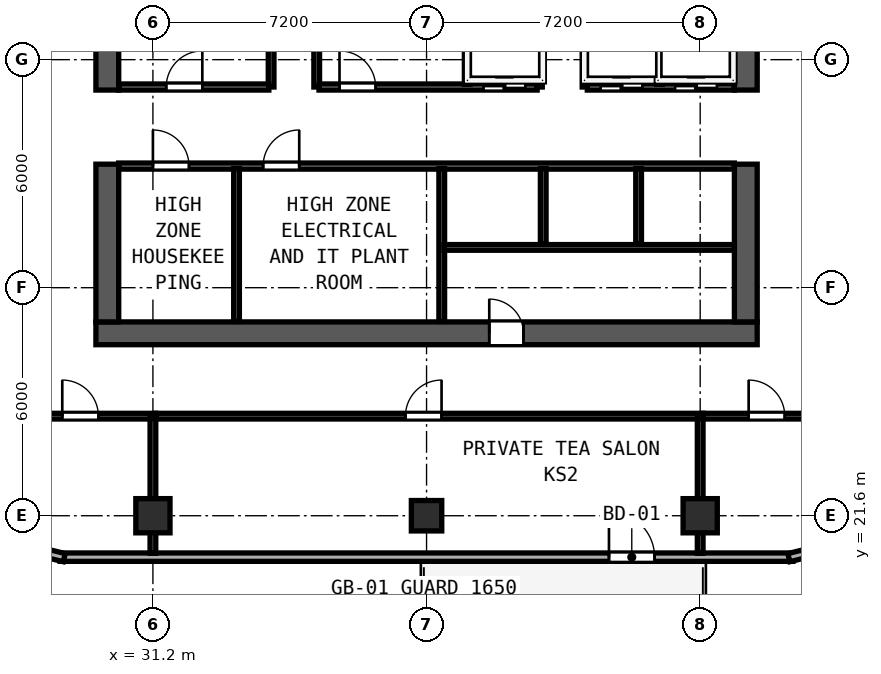
"""IFC4 building model, lengths in metres.
Left out: names, types, materials, properties, quantities, classifications, styles, units other than length and angle.
Written with IfcOpenShell. Run it as: python <this file> out.ifc"""

import sys

from ifc_helpers import new_model, si_unit, direction, frame, frame_2d, origin, origin_2d, place, context, subcontext, project, spatial, rectangle, hollow_rectangle, extrude, element, fill, save


model = new_model("IFC4")
c1 = context("Model", 3, precision=1e-05, world=origin(), true_north=direction((0.0, 1.0)))
c2 = subcontext(c1, "Body", "Model", "MODEL_VIEW")
j1 = project(units=[si_unit("LENGTHUNIT", "METRE"), si_unit("PLANEANGLEUNIT", "RADIAN")], contexts=[c1])
p1 = place(None, origin())
s1 = spatial("IfcSite", under=j1, at=p1, CompositionType="ELEMENT")
p2 = place(p1, origin())
s2 = spatial("IfcBuilding", under=s1, at=p2, CompositionType="ELEMENT")
p3 = place(p2, frame((0.0, 0.0, 176.6)))
s3 = spatial("IfcBuildingStorey", under=s2, at=p3, CompositionType="ELEMENT", Elevation=176.6)
p4 = place(p3, frame((29.7, 26.4, 0.0), z_axis=(0.0, 0.0, 1.0), x_axis=(1.0, 0.0, 0.0)))
e1 = element("IfcWall", 1, at=p4, inside=s3, PredefinedType="SHEAR", context=c2, shape_type="SweptSolid", body=[
    extrude(rectangle(XDim=17.4, YDim=0.6, at=frame_2d((8.7, 0.0))), origin(), (0.0, 0.0, 1.0), 3.62),
])
p5 = place(p4, frame((11.25, 0.0, 0.0), z_axis=(0.0, 0.0, 1.0), x_axis=(-1.0, 0.0, 0.0)))
e2 = element("IfcOpeningElement", 2, at=p5, cuts=e1, PredefinedType="OPENING", context=c2, shape_type="SweptSolid", body=[
    extrude(rectangle(XDim=0.9, YDim=2.1, at=frame_2d((0.45, 1.05))), frame((0.0, 0.31, 0.0), z_axis=(0.0, -1.0, 0.0), x_axis=(1.0, 0.0, 0.0)), (0.0, 0.0, 1.0), 0.62),
])
p6 = place(p3, frame((30.0, 26.7, 0.0), z_axis=(0.0, 0.0, 1.0), x_axis=(0.0, 1.0, 0.0)))
e3 = element("IfcWall", 3, at=p6, inside=s3, PredefinedType="SHEAR", context=c2, shape_type="SweptSolid", body=[
    extrude(rectangle(XDim=4.15, YDim=0.6, at=frame_2d((2.075, 0.0))), origin(), (0.0, 0.0, 1.0), 3.62),
])
p7 = place(p3, frame((30.0, 32.8, 0.0), z_axis=(0.0, 0.0, 1.0), x_axis=(0.0, 1.0, 0.0)))
e4 = element("IfcWall", 4, at=p7, inside=s3, PredefinedType="SHEAR", context=c2, shape_type="SweptSolid", body=[
    extrude(rectangle(XDim=10.1, YDim=0.6, at=frame_2d((5.05, 0.0))), origin(), (0.0, 0.0, 1.0), 3.62),
])
p8 = place(p3, frame((46.8, 26.7, 0.0), z_axis=(0.0, 0.0, 1.0), x_axis=(0.0, 1.0, 0.0)))
e5 = element("IfcWall", 5, at=p8, inside=s3, PredefinedType="SHEAR", context=c2, shape_type="SweptSolid", body=[
    extrude(rectangle(XDim=4.15, YDim=0.6, at=frame_2d((2.075, 0.0))), origin(), (0.0, 0.0, 1.0), 3.62),
])
p9 = place(p3, frame((46.8, 32.8, 0.0), z_axis=(0.0, 0.0, 1.0), x_axis=(0.0, 1.0, 0.0)))
e6 = element("IfcWall", 6, at=p9, inside=s3, PredefinedType="SHEAR", context=c2, shape_type="SweptSolid", body=[
    extrude(rectangle(XDim=10.1, YDim=0.6, at=frame_2d((5.05, 0.0))), origin(), (0.0, 0.0, 1.0), 3.62),
])
for number, where, z_axis, x_axis in (
    (7, (31.2, 21.6, 0.0), (0.0, 0.0, 1.0), (1.0, 0.0, 0.0)),
    (8, (45.6, 21.6, 0.0), (0.0, 0.0, 1.0), (1.0, 0.0, 0.0)),
):
    element("IfcColumn", number, at=place(p3, frame(where, z_axis=z_axis, x_axis=x_axis)), inside=s3, PredefinedType="COLUMN", context=c2, shape_type="SweptSolid", body=[
        extrude(hollow_rectangle(XDim=0.9, YDim=0.9, WallThickness=0.034, at=origin_2d()), origin(), (0.0, 0.0, 1.0), 3.8),
    ])
p10 = place(p3, frame((38.4, 21.6, 0.0), z_axis=(0.0, 0.0, 1.0), x_axis=(1.0, 0.0, 0.0)))
e9 = element("IfcColumn", 9, at=p10, inside=s3, PredefinedType="COLUMN", context=c2, shape_type="SweptSolid", body=[
    extrude(hollow_rectangle(XDim=0.8, YDim=0.8, WallThickness=0.03, at=origin_2d()), origin(), (0.0, 0.0, 1.0), 3.8),
])
p11 = place(p3, frame((28.759, 20.51, 0.0), z_axis=(0.0, 0.0, 1.0), x_axis=(1.0, 0.0, 0.0)))
e10 = element("IfcWall", 10, at=p11, inside=s3, PredefinedType="SOLIDWALL", context=c2, shape_type="SweptSolid", body=[
    extrude(rectangle(XDim=19.283, YDim=0.22, at=frame_2d((9.642, 0.0))), origin(), (0.0, 0.0, 1.0), 3.62),
])
p12 = place(p11, frame((15.641, 0.0, 0.0), z_axis=(0.0, 0.0, 1.0), x_axis=(-1.0, 0.0, 0.0)))
e11 = element("IfcOpeningElement", 11, at=p12, cuts=e10, PredefinedType="OPENING", context=c2, shape_type="SweptSolid", body=[
    extrude(rectangle(XDim=1.2, YDim=2.15, at=frame_2d((0.6, 1.075))), frame((0.0, 0.12, 0.0), z_axis=(0.0, -1.0, 0.0), x_axis=(1.0, 0.0, 0.0)), (0.0, 0.0, 1.0), 0.24),
])
p13 = place(p3, frame((47.933, 20.497, 0.0), z_axis=(0.0, 0.0, 1.0), x_axis=(0.970142500145, 0.242535625036, 0.0)))
e12 = element("IfcWall", 12, at=p13, inside=s3, PredefinedType="SOLIDWALL", context=c2, shape_type="SweptSolid", body=[
    extrude(rectangle(XDim=4.561, YDim=0.22, at=frame_2d((2.281, 0.0))), origin(), (0.0, 0.0, 1.0), 3.215),
])
p14 = place(p13, frame((0.7, 0.0, 0.85)))
e13 = element("IfcOpeningElement", 13, at=p14, cuts=e12, PredefinedType="OPENING", context=c2, shape_type="SweptSolid", body=[
    extrude(rectangle(XDim=1.1, YDim=1.75, at=frame_2d((0.55, 0.875))), frame((0.0, 0.12, 0.0), z_axis=(0.0, -1.0, 0.0), x_axis=(1.0, 0.0, 0.0)), (0.0, 0.0, 1.0), 0.24),
])
p15 = place(p3, frame((24.442, 21.603, 0.0), z_axis=(0.0, 0.0, 1.0), x_axis=(0.970145648609, -0.242523030833, 0.0)))
e14 = element("IfcWall", 14, at=p15, inside=s3, PredefinedType="SOLIDWALL", context=c2, shape_type="SweptSolid", body=[
    extrude(rectangle(XDim=4.561, YDim=0.22, at=frame_2d((2.281, 0.0))), origin(), (0.0, 0.0, 1.0), 3.215),
])
p16 = place(p15, frame((0.7, 0.0, 0.85)))
e15 = element("IfcOpeningElement", 15, at=p16, cuts=e14, PredefinedType="OPENING", context=c2, shape_type="SweptSolid", body=[
    extrude(rectangle(XDim=1.1, YDim=1.75, at=frame_2d((0.55, 0.875))), frame((0.0, 0.12, 0.0), z_axis=(0.0, -1.0, 0.0), x_axis=(1.0, 0.0, 0.0)), (0.0, 0.0, 1.0), 0.24),
])
for number, where, z_axis, x_axis in (
    (16, (34.31, 32.88, 0.0), (0.0, 0.0, 1.0), (0.0, 1.0, 0.0)),
    (17, (35.51, 32.88, 0.0), (0.0, 0.0, 1.0), (0.0, 1.0, 0.0)),
    (18, (41.37, 32.88, 0.0), (0.0, 0.0, 1.0), (0.0, 1.0, 0.0)),
    (19, (42.57, 32.88, 0.0), (0.0, 0.0, 1.0), (0.0, 1.0, 0.0)),
):
    element("IfcWall", number, at=place(p3, frame(where, z_axis=z_axis, x_axis=x_axis)), inside=s3, PredefinedType="SOLIDWALL", context=c2, shape_type="SweptSolid", body=[
        extrude(rectangle(XDim=2.17, YDim=0.15, at=frame_2d((1.085, 0.0))), origin(), (0.0, 0.0, 1.0), 3.62),
    ])
p17 = place(p3, frame((30.3, 32.88, 0.0), z_axis=(0.0, 0.0, 1.0), x_axis=(1.0, 0.0, 0.0)))
e20 = element("IfcWall", 20, at=p17, inside=s3, PredefinedType="SOLIDWALL", context=c2, shape_type="SweptSolid", body=[
    extrude(rectangle(XDim=3.95, YDim=0.16, at=frame_2d((1.975, 0.0))), origin(), (0.0, 0.0, 1.0), 3.62),
])
p18 = place(p17, frame((2.2, 0.0, 0.0), z_axis=(0.0, 0.0, 1.0), x_axis=(-1.0, 0.0, 0.0)))
e21 = element("IfcOpeningElement", 21, at=p18, cuts=e20, PredefinedType="OPENING", context=c2, shape_type="SweptSolid", body=[
    extrude(rectangle(XDim=0.95, YDim=2.12, at=frame_2d((0.475, 1.06))), frame((0.0, 0.09, 0.0), z_axis=(0.0, -1.0, 0.0), x_axis=(1.0, 0.0, 0.0)), (0.0, 0.0, 1.0), 0.18),
])
p19 = place(p3, frame((35.57, 32.88, 0.0), z_axis=(0.0, 0.0, 1.0), x_axis=(1.0, 0.0, 0.0)))
e22 = element("IfcWall", 22, at=p19, inside=s3, PredefinedType="SOLIDWALL", context=c2, shape_type="SweptSolid", body=[
    extrude(rectangle(XDim=5.74, YDim=0.16, at=frame_2d((2.87, 0.0))), origin(), (0.0, 0.0, 1.0), 3.62),
])
p20 = place(p19, frame((1.49, 0.0, 0.0), z_axis=(0.0, 0.0, 1.0), x_axis=(-1.0, 0.0, 0.0)))
e23 = element("IfcOpeningElement", 23, at=p20, cuts=e22, PredefinedType="OPENING", context=c2, shape_type="SweptSolid", body=[
    extrude(rectangle(XDim=0.95, YDim=2.12, at=frame_2d((0.475, 1.06))), frame((0.0, 0.09, 0.0), z_axis=(0.0, -1.0, 0.0), x_axis=(1.0, 0.0, 0.0)), (0.0, 0.0, 1.0), 0.18),
])
p21 = place(p19, frame((5.43, 0.0, 0.0), z_axis=(0.0, 0.0, 1.0), x_axis=(-1.0, 0.0, 0.0)))
e24 = element("IfcOpeningElement", 24, at=p21, cuts=e22, PredefinedType="OPENING", context=c2, shape_type="SweptSolid", body=[
    extrude(rectangle(XDim=1.1, YDim=2.2, at=frame_2d((0.55, 1.1))), frame((0.0, 0.09, 0.0), z_axis=(0.0, -1.0, 0.0), x_axis=(1.0, 0.0, 0.0)), (0.0, 0.0, 1.0), 0.18),
])
p22 = place(p3, frame((42.63, 32.88, 0.0), z_axis=(0.0, 0.0, 1.0), x_axis=(1.0, 0.0, 0.0)))
e25 = element("IfcWall", 25, at=p22, inside=s3, PredefinedType="SOLIDWALL", context=c2, shape_type="SweptSolid", body=[
    extrude(rectangle(XDim=3.87, YDim=0.16, at=frame_2d((1.935, 0.0))), origin(), (0.0, 0.0, 1.0), 3.62),
])
p23 = place(p22, frame((1.45, 0.0, 0.0), z_axis=(0.0, 0.0, 1.0), x_axis=(-1.0, 0.0, 0.0)))
e26 = element("IfcOpeningElement", 26, at=p23, cuts=e25, PredefinedType="OPENING", context=c2, shape_type="SweptSolid", body=[
    extrude(rectangle(XDim=1.1, YDim=2.2, at=frame_2d((0.55, 1.1))), frame((0.0, 0.09, 0.0), z_axis=(0.0, -1.0, 0.0), x_axis=(1.0, 0.0, 0.0)), (0.0, 0.0, 1.0), 0.18),
])
p24 = place(p22, frame((3.41, 0.0, 0.0), z_axis=(0.0, 0.0, 1.0), x_axis=(-1.0, 0.0, 0.0)))
e27 = element("IfcOpeningElement", 27, at=p24, cuts=e25, PredefinedType="OPENING", context=c2, shape_type="SweptSolid", body=[
    extrude(rectangle(XDim=1.1, YDim=2.2, at=frame_2d((0.55, 1.1))), frame((0.0, 0.09, 0.0), z_axis=(0.0, -1.0, 0.0), x_axis=(1.0, 0.0, 0.0)), (0.0, 0.0, 1.0), 0.18),
])
for number, where, z_axis, x_axis in (
    (28, (39.47, 32.95, 0.0), (0.0, 0.0, 1.0), (0.0, 1.0, 0.0)),
    (29, (44.53, 32.95, 0.0), (0.0, 0.0, 1.0), (0.0, 1.0, 0.0)),
):
    element("IfcWall", number, at=place(p3, frame(where, z_axis=z_axis, x_axis=x_axis)), inside=s3, PredefinedType="SOLIDWALL", context=c2, shape_type="SweptSolid", body=[
        extrude(rectangle(XDim=2.05, YDim=0.15, at=frame_2d((1.025, 0.0))), origin(), (0.0, 0.0, 1.0), 3.62),
    ])
p25 = place(p3, frame((30.3, 30.8, 0.0), z_axis=(0.0, 0.0, 1.0), x_axis=(1.0, 0.0, 0.0)))
e30 = element("IfcWall", 30, at=p25, inside=s3, PredefinedType="SOLIDWALL", context=c2, shape_type="SweptSolid", body=[
    extrude(rectangle(XDim=16.2, YDim=0.16, at=frame_2d((8.1, 0.0))), origin(), (0.0, 0.0, 1.0), 3.62),
])
p26 = place(p25, frame((0.9, 0.0, 0.0)))
e31 = element("IfcOpeningElement", 31, at=p26, cuts=e30, PredefinedType="OPENING", context=c2, shape_type="SweptSolid", body=[
    extrude(rectangle(XDim=0.95, YDim=2.12, at=frame_2d((0.475, 1.06))), frame((0.0, 0.09, 0.0), z_axis=(0.0, -1.0, 0.0), x_axis=(1.0, 0.0, 0.0)), (0.0, 0.0, 1.0), 0.18),
])
p27 = place(p25, frame((3.8, 0.0, 0.0)))
e32 = element("IfcOpeningElement", 32, at=p27, cuts=e30, PredefinedType="OPENING", context=c2, shape_type="SweptSolid", body=[
    extrude(rectangle(XDim=0.95, YDim=2.12, at=frame_2d((0.475, 1.06))), frame((0.0, 0.09, 0.0), z_axis=(0.0, -1.0, 0.0), x_axis=(1.0, 0.0, 0.0)), (0.0, 0.0, 1.0), 0.18),
])
p28 = place(p3, frame((38.8, 26.71, 0.0), z_axis=(0.0, 0.0, 1.0), x_axis=(0.0, 1.0, 0.0)))
e33 = element("IfcWall", 33, at=p28, inside=s3, PredefinedType="SOLIDWALL", context=c2, shape_type="SweptSolid", body=[
    extrude(rectangle(XDim=4.025, YDim=0.15, at=frame_2d((2.013, 0.0))), origin(), (0.0, 0.0, 1.0), 3.62),
])
p29 = place(p3, frame((33.4, 26.71, 0.0), z_axis=(0.0, 0.0, 1.0), x_axis=(0.0, 1.0, 0.0)))
e34 = element("IfcWall", 34, at=p29, inside=s3, PredefinedType="PARTITIONING", context=c2, shape_type="SweptSolid", body=[
    extrude(rectangle(XDim=4.025, YDim=0.15, at=frame_2d((2.013, 0.0))), origin(), (0.0, 0.0, 1.0), 3.62),
])
p30 = place(p3, frame((38.86, 28.66, 0.0), z_axis=(0.0, 0.0, 1.0), x_axis=(1.0, 0.0, 0.0)))
e35 = element("IfcWall", 35, at=p30, inside=s3, PredefinedType="PARTITIONING", context=c2, shape_type="SweptSolid", body=[
    extrude(rectangle(XDim=7.64, YDim=0.15, at=frame_2d((3.82, 0.0))), origin(), (0.0, 0.0, 1.0), 3.62),
])
for number, where, z_axis, x_axis in (
    (36, (41.47, 28.75, 0.0), (0.0, 0.0, 1.0), (0.0, 1.0, 0.0)),
    (37, (43.98, 28.75, 0.0), (0.0, 0.0, 1.0), (0.0, 1.0, 0.0)),
):
    element("IfcWall", number, at=place(p3, frame(where, z_axis=z_axis, x_axis=x_axis)), inside=s3, PredefinedType="SOLIDWALL", context=c2, shape_type="SweptSolid", body=[
        extrude(rectangle(XDim=1.985, YDim=0.15, at=frame_2d((0.993, 0.0))), origin(), (0.0, 0.0, 1.0), 3.62),
    ])
p31 = place(p3, frame((23.92, 24.22, 0.0), z_axis=(0.0, 0.0, 1.0), x_axis=(1.0, 0.0, 0.0)))
e38 = element("IfcWall", 38, at=p31, inside=s3, PredefinedType="PARTITIONING", context=c2, shape_type="SweptSolid", body=[
    extrude(rectangle(XDim=7.36, YDim=0.15, at=frame_2d((3.68, 0.0))), origin(), (0.0, 0.0, 1.0), 3.62),
])
p32 = place(p31, frame((5.845, 0.0, 0.0), z_axis=(0.0, 0.0, 1.0), x_axis=(-1.0, 0.0, 0.0)))
e39 = element("IfcOpeningElement", 39, at=p32, cuts=e38, PredefinedType="OPENING", context=c2, shape_type="SweptSolid", body=[
    extrude(rectangle(XDim=0.95, YDim=2.12, at=frame_2d((0.475, 1.06))), frame((0.0, 0.085, 0.0), z_axis=(0.0, -1.0, 0.0), x_axis=(1.0, 0.0, 0.0)), (0.0, 0.0, 1.0), 0.17),
])
p33 = place(p3, frame((31.2, 20.612, 0.0), z_axis=(0.0, 0.0, 1.0), x_axis=(0.0, 1.0, 0.0)))
e40 = element("IfcWall", 40, at=p33, inside=s3, PredefinedType="PARTITIONING", context=c2, shape_type="SweptSolid", body=[
    extrude(rectangle(XDim=3.548, YDim=0.15, at=frame_2d((1.774, 0.0))), origin(), (0.0, 0.0, 1.0), 3.105),
])
p34 = place(p3, frame((31.282, 24.22, 0.0), z_axis=(0.0, 0.0, 1.0), x_axis=(1.0, 0.0, 0.0)))
e41 = element("IfcWall", 41, at=p34, inside=s3, PredefinedType="PARTITIONING", context=c2, shape_type="SweptSolid", body=[
    extrude(rectangle(XDim=14.398, YDim=0.15, at=frame_2d((7.199, 0.0))), origin(), (0.0, 0.0, 1.0), 3.62),
])
p35 = place(p34, frame((7.513, 0.0, 0.0), z_axis=(0.0, 0.0, 1.0), x_axis=(-1.0, 0.0, 0.0)))
e42 = element("IfcOpeningElement", 42, at=p35, cuts=e41, PredefinedType="OPENING", context=c2, shape_type="SweptSolid", body=[
    extrude(rectangle(XDim=0.95, YDim=2.12, at=frame_2d((0.475, 1.06))), frame((0.0, 0.085, 0.0), z_axis=(0.0, -1.0, 0.0), x_axis=(1.0, 0.0, 0.0)), (0.0, 0.0, 1.0), 0.17),
])
p36 = place(p3, frame((45.6, 20.612, 0.0), z_axis=(0.0, 0.0, 1.0), x_axis=(0.0, 1.0, 0.0)))
e43 = element("IfcWall", 43, at=p36, inside=s3, PredefinedType="PARTITIONING", context=c2, shape_type="SweptSolid", body=[
    extrude(rectangle(XDim=3.548, YDim=0.15, at=frame_2d((1.774, 0.0))), origin(), (0.0, 0.0, 1.0), 3.105),
])
p37 = place(p3, frame((45.682, 24.22, 0.0), z_axis=(0.0, 0.0, 1.0), x_axis=(1.0, 0.0, 0.0)))
e44 = element("IfcWall", 44, at=p37, inside=s3, PredefinedType="PARTITIONING", context=c2, shape_type="SweptSolid", body=[
    extrude(rectangle(XDim=7.198, YDim=0.15, at=frame_2d((3.599, 0.0))), origin(), (0.0, 0.0, 1.0), 3.62),
])
p38 = place(p37, frame((2.143, 0.0, 0.0), z_axis=(0.0, 0.0, 1.0), x_axis=(-1.0, 0.0, 0.0)))
e45 = element("IfcOpeningElement", 45, at=p38, cuts=e44, PredefinedType="OPENING", context=c2, shape_type="SweptSolid", body=[
    extrude(rectangle(XDim=0.95, YDim=2.12, at=frame_2d((0.475, 1.06))), frame((0.0, 0.085, 0.0), z_axis=(0.0, -1.0, 0.0), x_axis=(1.0, 0.0, 0.0)), (0.0, 0.0, 1.0), 0.17),
])
p39 = place(p12, origin())
e46 = element("IfcDoor", 46, at=p39, inside=s3, OperationType="SINGLE_SWING_RIGHT", PredefinedType="DOOR", context=c2, shape_type="SweptSolid", body=[
    extrude(rectangle(XDim=1.2, YDim=2.15, at=frame_2d((0.6, 1.075))), frame((0.0, 0.025, 0.0), z_axis=(0.0, -1.0, 0.0), x_axis=(1.0, 0.0, 0.0)), (0.0, 0.0, 1.0), 0.05),
])
fill(e11, e46)
p40 = place(p18, origin())
e47 = element("IfcDoor", 47, at=p40, inside=s3, OperationType="SINGLE_SWING_LEFT", PredefinedType="DOOR", context=c2, shape_type="SweptSolid", body=[
    extrude(rectangle(XDim=0.95, YDim=2.12, at=frame_2d((0.475, 1.06))), frame((0.0, 0.025, 0.0), z_axis=(0.0, -1.0, 0.0), x_axis=(1.0, 0.0, 0.0)), (0.0, 0.0, 1.0), 0.05),
])
fill(e21, e47)
p41 = place(p20, origin())
e48 = element("IfcDoor", 48, at=p41, inside=s3, OperationType="SINGLE_SWING_RIGHT", PredefinedType="DOOR", context=c2, shape_type="SweptSolid", body=[
    extrude(rectangle(XDim=0.95, YDim=2.12, at=frame_2d((0.475, 1.06))), frame((0.0, 0.025, 0.0), z_axis=(0.0, -1.0, 0.0), x_axis=(1.0, 0.0, 0.0)), (0.0, 0.0, 1.0), 0.05),
])
fill(e23, e48)
p42 = place(p21, origin())
e49 = element("IfcDoor", 49, at=p42, inside=s3, OperationType="SLIDING_TO_RIGHT", PredefinedType="DOOR", context=c2, shape_type="SweptSolid", body=[
    extrude(rectangle(XDim=1.1, YDim=2.2, at=frame_2d((0.55, 1.1))), frame((0.0, 0.025, 0.0), z_axis=(0.0, -1.0, 0.0), x_axis=(1.0, 0.0, 0.0)), (0.0, 0.0, 1.0), 0.05),
])
fill(e24, e49)
p43 = place(p23, origin())
e50 = element("IfcDoor", 50, at=p43, inside=s3, OperationType="SLIDING_TO_RIGHT", PredefinedType="DOOR", context=c2, shape_type="SweptSolid", body=[
    extrude(rectangle(XDim=1.1, YDim=2.2, at=frame_2d((0.55, 1.1))), frame((0.0, 0.025, 0.0), z_axis=(0.0, -1.0, 0.0), x_axis=(1.0, 0.0, 0.0)), (0.0, 0.0, 1.0), 0.05),
])
fill(e26, e50)
p44 = place(p24, origin())
e51 = element("IfcDoor", 51, at=p44, inside=s3, OperationType="SLIDING_TO_RIGHT", PredefinedType="DOOR", context=c2, shape_type="SweptSolid", body=[
    extrude(rectangle(XDim=1.1, YDim=2.2, at=frame_2d((0.55, 1.1))), frame((0.0, 0.025, 0.0), z_axis=(0.0, -1.0, 0.0), x_axis=(1.0, 0.0, 0.0)), (0.0, 0.0, 1.0), 0.05),
])
fill(e27, e51)
p45 = place(p26, origin())
e52 = element("IfcDoor", 52, at=p45, inside=s3, OperationType="SINGLE_SWING_LEFT", PredefinedType="DOOR", context=c2, shape_type="SweptSolid", body=[
    extrude(rectangle(XDim=0.95, YDim=2.12, at=frame_2d((0.475, 1.06))), frame((0.0, 0.025, 0.0), z_axis=(0.0, -1.0, 0.0), x_axis=(1.0, 0.0, 0.0)), (0.0, 0.0, 1.0), 0.05),
])
fill(e31, e52)
p46 = place(p27, origin())
e53 = element("IfcDoor", 53, at=p46, inside=s3, OperationType="SINGLE_SWING_RIGHT", PredefinedType="DOOR", context=c2, shape_type="SweptSolid", body=[
    extrude(rectangle(XDim=0.95, YDim=2.12, at=frame_2d((0.475, 1.06))), frame((0.0, 0.025, 0.0), z_axis=(0.0, -1.0, 0.0), x_axis=(1.0, 0.0, 0.0)), (0.0, 0.0, 1.0), 0.05),
])
fill(e32, e53)
p47 = place(p5, origin())
e54 = element("IfcDoor", 54, at=p47, inside=s3, OperationType="SINGLE_SWING_RIGHT", PredefinedType="DOOR", context=c2, shape_type="SweptSolid", body=[
    extrude(rectangle(XDim=0.9, YDim=2.1, at=frame_2d((0.45, 1.05))), frame((0.0, -0.195, 0.0), z_axis=(0.0, -1.0, 0.0), x_axis=(1.0, 0.0, 0.0)), (0.0, 0.0, 1.0), 0.05),
])
fill(e2, e54)
p48 = place(p32, origin())
e55 = element("IfcDoor", 55, at=p48, inside=s3, OperationType="SINGLE_SWING_RIGHT", PredefinedType="DOOR", context=c2, shape_type="SweptSolid", body=[
    extrude(rectangle(XDim=0.95, YDim=2.12, at=frame_2d((0.475, 1.06))), frame((0.0, 0.025, 0.0), z_axis=(0.0, -1.0, 0.0), x_axis=(1.0, 0.0, 0.0)), (0.0, 0.0, 1.0), 0.05),
])
fill(e39, e55)
p49 = place(p35, origin())
e56 = element("IfcDoor", 56, at=p49, inside=s3, OperationType="SINGLE_SWING_LEFT", PredefinedType="DOOR", context=c2, shape_type="SweptSolid", body=[
    extrude(rectangle(XDim=0.95, YDim=2.12, at=frame_2d((0.475, 1.06))), frame((0.0, 0.025, 0.0), z_axis=(0.0, -1.0, 0.0), x_axis=(1.0, 0.0, 0.0)), (0.0, 0.0, 1.0), 0.05),
])
fill(e42, e56)
p50 = place(p38, origin())
e57 = element("IfcDoor", 57, at=p50, inside=s3, OperationType="SINGLE_SWING_RIGHT", PredefinedType="DOOR", context=c2, shape_type="SweptSolid", body=[
    extrude(rectangle(XDim=0.95, YDim=2.12, at=frame_2d((0.475, 1.06))), frame((0.0, 0.025, 0.0), z_axis=(0.0, -1.0, 0.0), x_axis=(1.0, 0.0, 0.0)), (0.0, 0.0, 1.0), 0.05),
])
fill(e45, e57)
save(model, sys.argv[1])
